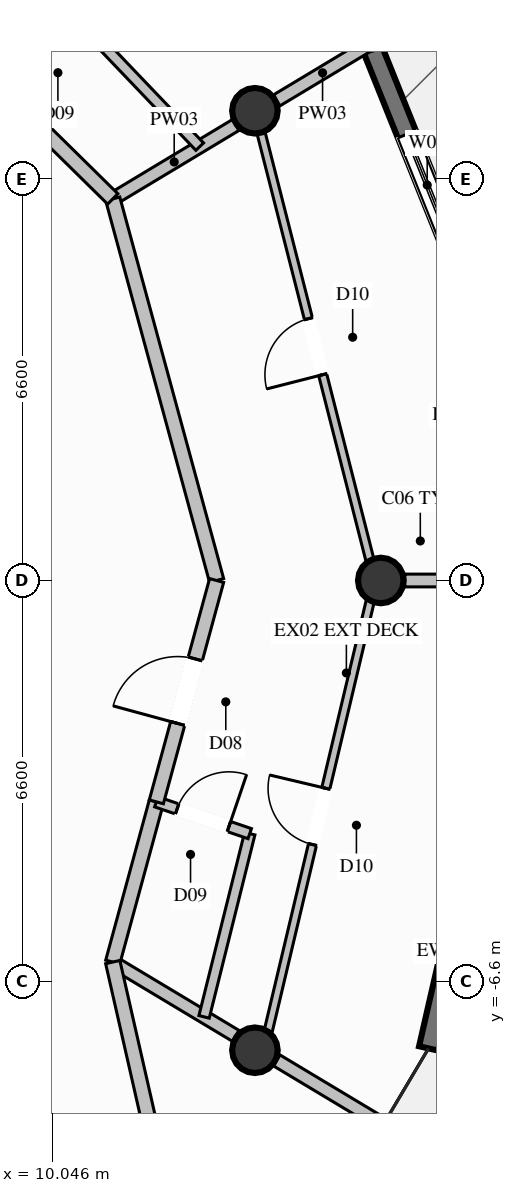
"""IFC4 building model, lengths in metres.
Left out: names, types, materials, properties, quantities, classifications, styles, units other than length and angle.
Written with IfcOpenShell. Run it as: python <this file> out.ifc"""

import sys

from ifc_helpers import new_model, si_unit, direction, frame, frame_2d, origin, origin_2d, place, context, subcontext, project, spatial, rectangle, circle, extrude, element, fill, save


model = new_model("IFC4")
c1 = context("Model", 3, precision=1e-05, world=origin(), true_north=direction((0.0, 1.0)))
c2 = subcontext(c1, "Body", "Model", "MODEL_VIEW")
j1 = project(units=[si_unit("LENGTHUNIT", "METRE"), si_unit("PLANEANGLEUNIT", "RADIAN")], contexts=[c1])
p1 = place(None, origin())
s1 = spatial("IfcSite", under=j1, at=p1, CompositionType="ELEMENT")
p2 = place(p1, origin())
s2 = spatial("IfcBuilding", under=s1, at=p2, CompositionType="ELEMENT")
p3 = place(p2, frame((0.0, 0.0, 239.2)))
s3 = spatial("IfcBuildingStorey", under=s2, at=p3, CompositionType="ELEMENT", Elevation=239.2)
for number, where, z_axis, x_axis in (
    (1, (15.45, 0.0, 0.0), (0.0, 0.0, 1.0), (1.0, 0.0, 0.0)),
    (2, (13.38, 7.725, 0.0), (0.0, 0.0, 1.0), (1.0, 0.0, 0.0)),
    (3, (13.38, -7.725, 0.0), (0.0, 0.0, 1.0), (1.0, 0.0, 0.0)),
):
    element("IfcColumn", number, at=place(p3, frame(where, z_axis=z_axis, x_axis=x_axis)), inside=s3, PredefinedType="COLUMN", context=c2, shape_type="SweptSolid", body=[
        extrude(circle(Radius=0.375, at=origin_2d()), origin(), (0.0, 0.0, 1.0), 3.8),
    ])
p4 = place(p3, frame((17.587, -1.795, 0.0), z_axis=(0.0, 0.0, 1.0), x_axis=(-0.223174159959, -0.974778587335, 0.0)))
e4 = element("IfcWall", 4, at=p4, inside=s3, PredefinedType="SOLIDWALL", context=c2, shape_type="SweptSolid", body=[
    extrude(rectangle(XDim=6.053, YDim=0.32, at=frame_2d((3.026, 0.0))), origin(), (0.0, 0.0, 1.0), 3.57),
])
p5 = place(p4, frame((2.126, 0.0, 0.35)))
e5 = element("IfcOpeningElement", 5, at=p5, cuts=e4, PredefinedType="OPENING", context=c2, shape_type="SweptSolid", body=[
    extrude(rectangle(XDim=1.8, YDim=2.6, at=frame_2d((0.9, 1.3))), frame((0.0, 0.17, 0.0), z_axis=(0.0, -1.0, 0.0), x_axis=(1.0, 0.0, 0.0)), (0.0, 0.0, 1.0), 0.34),
])
p6 = place(p3, frame((14.835, 9.939, 0.0), z_axis=(0.0, 0.0, 1.0), x_axis=(0.372412492589, -0.928067311871, 0.0)))
e6 = element("IfcWall", 6, at=p6, inside=s3, PredefinedType="SOLIDWALL", context=c2, shape_type="SweptSolid", body=[
    extrude(rectangle(XDim=6.095, YDim=0.32, at=frame_2d((3.048, 0.0))), origin(), (0.0, 0.0, 1.0), 3.57),
])
p7 = place(p6, frame((2.802, 0.0, 0.35)))
e7 = element("IfcOpeningElement", 7, at=p7, cuts=e6, PredefinedType="OPENING", context=c2, shape_type="SweptSolid", body=[
    extrude(rectangle(XDim=1.8, YDim=2.6, at=frame_2d((0.9, 1.3))), frame((0.0, 0.17, 0.0), z_axis=(0.0, -1.0, 0.0), x_axis=(1.0, 0.0, 0.0)), (0.0, 0.0, 1.0), 0.34),
])
p8 = place(p3, frame((11.042, 6.275, 0.0), z_axis=(0.0, 0.0, 1.0), x_axis=(0.857026686246, 0.515272024335, 0.0)))
e8 = element("IfcWall", 8, at=p8, inside=s3, PredefinedType="PARTITIONING", context=c2, shape_type="SweptSolid", body=[
    extrude(rectangle(XDim=2.358, YDim=0.21, at=frame_2d((1.179, 0.0))), origin(), (0.0, 0.0, 1.0), 3.011),
])
p9 = place(p3, frame((13.737, 7.895, 0.0), z_axis=(0.0, 0.0, 1.0), x_axis=(0.857150569961, 0.515065918514, 0.0)))
e9 = element("IfcWall", 9, at=p9, inside=s3, PredefinedType="PARTITIONING", context=c2, shape_type="SweptSolid", body=[
    extrude(rectangle(XDim=1.763, YDim=0.21, at=frame_2d((0.881, 0.0))), origin(), (0.0, 0.0, 1.0), 3.57),
])
p10 = place(p3, frame((11.042, -6.275, 0.0), z_axis=(0.0, 0.0, 1.0), x_axis=(0.857502061287, -0.514480529164, 0.0)))
e10 = element("IfcWall", 10, at=p10, inside=s3, PredefinedType="PARTITIONING", context=c2, shape_type="SweptSolid", body=[
    extrude(rectangle(XDim=2.358, YDim=0.21, at=frame_2d((1.179, 0.0))), origin(), (0.0, 0.0, 1.0), 3.011),
])
p11 = place(p3, frame((13.738, -7.892, 0.0), z_axis=(0.0, 0.0, 1.0), x_axis=(0.857407053578, -0.514638848587, 0.0)))
e11 = element("IfcWall", 11, at=p11, inside=s3, PredefinedType="PARTITIONING", context=c2, shape_type="SweptSolid", body=[
    extrude(rectangle(XDim=2.007, YDim=0.21, at=frame_2d((1.003, 0.0))), origin(), (0.0, 0.0, 1.0), 3.57),
])
p12 = place(p3, frame((11.042, -6.275, 0.0), z_axis=(0.0, 0.0, 1.0), x_axis=(0.262572701387, 0.964912211803, 0.0)))
e12 = element("IfcWall", 12, at=p12, inside=s3, PredefinedType="PARTITIONING", context=c2, shape_type="SweptSolid", body=[
    extrude(rectangle(XDim=2.731, YDim=0.24, at=frame_2d((1.365, 0.0))), origin(), (0.0, 0.0, 1.0), 3.57),
])
p13 = place(p3, frame((12.544, -7.176, 0.0), z_axis=(0.0, 0.0, 1.0), x_axis=(0.241851063072, 0.970313384062, 0.0)))
e13 = element("IfcWall", 13, at=p13, inside=s3, PredefinedType="PLUMBINGWALL", context=c2, shape_type="SweptSolid", body=[
    extrude(rectangle(XDim=3.105, YDim=0.175, at=frame_2d((1.553, 0.0))), origin(), (0.0, 0.0, 1.0), 3.57),
])
p14 = place(p3, frame((11.759, -3.64, 0.0), z_axis=(0.0, 0.0, 1.0), x_axis=(0.946586404748, -0.322450272671, 0.0)))
e14 = element("IfcWall", 14, at=p14, inside=s3, PredefinedType="PLUMBINGWALL", context=c2, shape_type="SweptSolid", body=[
    extrude(rectangle(XDim=1.623, YDim=0.175, at=frame_2d((0.811, 0.0))), origin(), (0.0, 0.0, 1.0), 3.57),
])
p15 = place(p14, frame((0.361, 0.0, 0.0)))
e15 = element("IfcOpeningElement", 15, at=p15, cuts=e14, PredefinedType="OPENING", context=c2, shape_type="SweptSolid", body=[
    extrude(rectangle(XDim=0.9, YDim=2.1, at=frame_2d((0.45, 1.05))), frame((0.0, 0.098, 0.0), z_axis=(0.0, -1.0, 0.0), x_axis=(1.0, 0.0, 0.0)), (0.0, 0.0, 1.0), 0.195),
])
p16 = place(p3, frame((15.845, 0.0, 0.0), z_axis=(0.0, 0.0, 1.0), x_axis=(1.0, 0.0, 0.0)))
e16 = element("IfcWall", 16, at=p16, inside=s3, PredefinedType="PARTITIONING", context=c2, shape_type="SweptSolid", body=[
    extrude(rectangle(XDim=1.56, YDim=0.21, at=frame_2d((0.78, 0.0))), origin(), (0.0, 0.0, 1.0), 3.57),
])
p17 = place(p3, frame((12.75, 0.0, 0.0), z_axis=(0.0, 0.0, 1.0), x_axis=(-0.262640884433, 0.964893655189, 0.0)))
e17 = element("IfcWall", 17, at=p17, inside=s3, PredefinedType="PARTITIONING", context=c2, shape_type="SweptSolid", body=[
    extrude(rectangle(XDim=6.503, YDim=0.24, at=frame_2d((3.251, 0.0))), origin(), (0.0, 0.0, 1.0), 3.57),
])
p18 = place(p3, frame((11.759, -3.64, 0.0), z_axis=(0.0, 0.0, 1.0), x_axis=(0.2626902414, 0.964880219029, 0.0)))
e18 = element("IfcWall", 18, at=p18, inside=s3, PredefinedType="PARTITIONING", context=c2, shape_type="SweptSolid", body=[
    extrude(rectangle(XDim=3.772, YDim=0.24, at=frame_2d((1.886, 0.0))), origin(), (0.0, 0.0, 1.0), 3.57),
])
p19 = place(p18, frame((1.336, 0.0, 0.0)))
e19 = element("IfcOpeningElement", 19, at=p19, cuts=e18, PredefinedType="OPENING", context=c2, shape_type="SweptSolid", body=[
    extrude(rectangle(XDim=1.1, YDim=2.3, at=frame_2d((0.55, 1.15))), frame((0.0, 0.13, 0.0), z_axis=(0.0, -1.0, 0.0), x_axis=(1.0, 0.0, 0.0)), (0.0, 0.0, 1.0), 0.26),
])
p20 = place(p3, frame((13.516, -7.759, 0.0), z_axis=(0.0, 0.0, 1.0), x_axis=(0.230840940032, 0.972991500685, 0.0)))
e20 = element("IfcWall", 20, at=p20, inside=s3, PredefinedType="PARTITIONING", context=c2, shape_type="SweptSolid", body=[
    extrude(rectangle(XDim=7.974, YDim=0.135, at=frame_2d((3.987, 0.0))), origin(), (0.0, 0.0, 1.0), 3.139),
])
p21 = place(p20, frame((3.512, 0.0, 0.0)))
e21 = element("IfcOpeningElement", 21, at=p21, cuts=e20, PredefinedType="OPENING", context=c2, shape_type="SweptSolid", body=[
    extrude(rectangle(XDim=0.95, YDim=2.1, at=frame_2d((0.475, 1.05))), frame((0.0, 0.078, 0.0), z_axis=(0.0, -1.0, 0.0), x_axis=(1.0, 0.0, 0.0)), (0.0, 0.0, 1.0), 0.155),
])
p22 = place(p3, frame((15.357, 0.0, 0.0), z_axis=(0.0, 0.0, 1.0), x_axis=(-0.246948201866, 0.969028681513, 0.0)))
e22 = element("IfcWall", 22, at=p22, inside=s3, PredefinedType="PARTITIONING", context=c2, shape_type="SweptSolid", body=[
    extrude(rectangle(XDim=7.937, YDim=0.135, at=frame_2d((3.968, 0.0))), origin(), (0.0, 0.0, 1.0), 3.139),
])
p23 = place(p22, frame((3.493, 0.0, 0.0)))
e23 = element("IfcOpeningElement", 23, at=p23, cuts=e22, PredefinedType="OPENING", context=c2, shape_type="SweptSolid", body=[
    extrude(rectangle(XDim=0.95, YDim=2.1, at=frame_2d((0.475, 1.05))), frame((0.0, 0.078, 0.0), z_axis=(0.0, -1.0, 0.0), x_axis=(1.0, 0.0, 0.0)), (0.0, 0.0, 1.0), 0.155),
])
p24 = place(p3, frame((11.042, 6.275, 0.0), z_axis=(0.0, 0.0, 1.0), x_axis=(-0.712677423321, 0.701491903224, 0.0)))
e24 = element("IfcWall", 24, at=p24, inside=s3, PredefinedType="PARTITIONING", context=c2, shape_type="SweptSolid", body=[
    extrude(rectangle(XDim=2.75, YDim=0.24, at=frame_2d((1.375, 0.0))), origin(), (0.0, 0.0, 1.0), 3.57),
])
p25 = place(p3, frame((12.472, 7.135, 0.0), z_axis=(0.0, 0.0, 1.0), x_axis=(-0.690671718567, 0.723168429324, 0.0)))
e25 = element("IfcWall", 25, at=p25, inside=s3, PredefinedType="PLUMBINGWALL", context=c2, shape_type="SweptSolid", body=[
    extrude(rectangle(XDim=3.14, YDim=0.175, at=frame_2d((1.57, 0.0))), origin(), (0.0, 0.0, 1.0), 3.57),
])
p26 = place(p3, frame((9.082, 8.204, 0.0), z_axis=(0.0, 0.0, 1.0), x_axis=(0.712642440828, 0.701527441751, 0.0)))
e26 = element("IfcWall", 26, at=p26, inside=s3, PredefinedType="PLUMBINGWALL", context=c2, shape_type="SweptSolid", body=[
    extrude(rectangle(XDim=1.713, YDim=0.175, at=frame_2d((0.857, 0.0))), origin(), (0.0, 0.0, 1.0), 3.57),
])
p27 = place(p26, frame((0.407, 0.0, 0.0)))
e27 = element("IfcOpeningElement", 27, at=p27, cuts=e26, PredefinedType="OPENING", context=c2, shape_type="SweptSolid", body=[
    extrude(rectangle(XDim=0.9, YDim=2.1, at=frame_2d((0.45, 1.05))), frame((0.0, 0.098, 0.0), z_axis=(0.0, -1.0, 0.0), x_axis=(1.0, 0.0, 0.0)), (0.0, 0.0, 1.0), 0.195),
])
p28 = place(p3, frame((12.3, -11.8, 0.0), z_axis=(0.0, 0.0, 1.0), x_axis=(-0.222014008723, 0.975043475918, 0.0)))
e28 = element("IfcWall", 28, at=p28, inside=s3, PredefinedType="PARTITIONING", context=c2, shape_type="SweptSolid", body=[
    extrude(rectangle(XDim=5.667, YDim=0.24, at=frame_2d((2.833, 0.0))), origin(), (0.0, 0.0, 1.0), 3.57),
])
p29 = place(p7, origin())
e29 = element("IfcWindow", 29, at=p29, inside=s3, PartitioningType="SINGLE_PANEL", PredefinedType="WINDOW", context=c2, shape_type="SweptSolid", body=[
    extrude(rectangle(XDim=1.8, YDim=2.6, at=frame_2d((0.9, 1.3))), frame((0.0, 0.03, 0.0), z_axis=(0.0, -1.0, 0.0), x_axis=(1.0, 0.0, 0.0)), (0.0, 0.0, 1.0), 0.06),
])
fill(e7, e29)
p30 = place(p15, origin())
e30 = element("IfcDoor", 30, at=p30, inside=s3, OperationType="SINGLE_SWING_RIGHT", PredefinedType="DOOR", context=c2, shape_type="SweptSolid", body=[
    extrude(rectangle(XDim=0.9, YDim=2.1, at=frame_2d((0.45, 1.05))), frame((0.0, 0.025, 0.0), z_axis=(0.0, -1.0, 0.0), x_axis=(1.0, 0.0, 0.0)), (0.0, 0.0, 1.0), 0.05),
])
fill(e15, e30)
p31 = place(p19, origin())
e31 = element("IfcDoor", 31, at=p31, inside=s3, OperationType="SINGLE_SWING_LEFT", PredefinedType="DOOR", context=c2, shape_type="SweptSolid", body=[
    extrude(rectangle(XDim=1.1, YDim=2.3, at=frame_2d((0.55, 1.15))), frame((0.0, 0.025, 0.0), z_axis=(0.0, -1.0, 0.0), x_axis=(1.0, 0.0, 0.0)), (0.0, 0.0, 1.0), 0.05),
])
fill(e19, e31)
p32 = place(p21, origin())
e32 = element("IfcDoor", 32, at=p32, inside=s3, OperationType="SINGLE_SWING_RIGHT", PredefinedType="DOOR", context=c2, shape_type="SweptSolid", body=[
    extrude(rectangle(XDim=0.95, YDim=2.1, at=frame_2d((0.475, 1.05))), frame((0.0, 0.025, 0.0), z_axis=(0.0, -1.0, 0.0), x_axis=(1.0, 0.0, 0.0)), (0.0, 0.0, 1.0), 0.05),
])
fill(e21, e32)
p33 = place(p23, origin())
e33 = element("IfcDoor", 33, at=p33, inside=s3, OperationType="SINGLE_SWING_LEFT", PredefinedType="DOOR", context=c2, shape_type="SweptSolid", body=[
    extrude(rectangle(XDim=0.95, YDim=2.1, at=frame_2d((0.475, 1.05))), frame((0.0, 0.025, 0.0), z_axis=(0.0, -1.0, 0.0), x_axis=(1.0, 0.0, 0.0)), (0.0, 0.0, 1.0), 0.05),
])
fill(e23, e33)
save(model, sys.argv[1])
